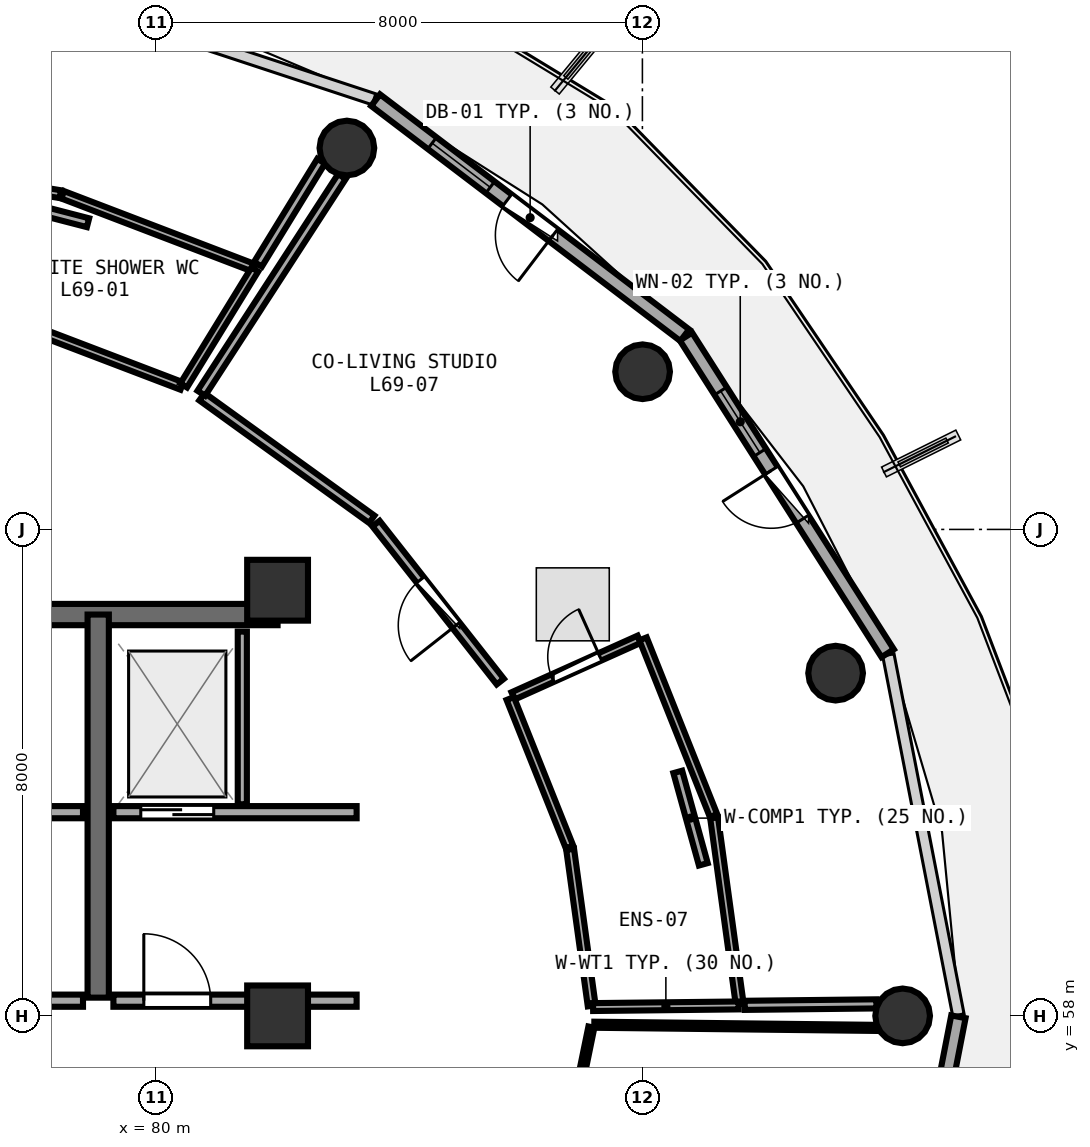
"""IFC4 building model, lengths in metres.
Left out: names, types, materials, properties, quantities, classifications, styles, units other than length and angle.
Written with IfcOpenShell. Run it as: python <this file> out.ifc"""

import sys

from ifc_helpers import new_model, si_unit, direction, frame, frame_2d, origin, origin_2d, place, context, subcontext, project, spatial, rectangle, circle, extrude, element, fill, save


model = new_model("IFC4")
c1 = context("Model", 3, precision=1e-05, world=origin(), true_north=direction((0.0, 1.0)))
c2 = subcontext(c1, "Body", "Model", "MODEL_VIEW")
j1 = project(units=[si_unit("LENGTHUNIT", "METRE"), si_unit("PLANEANGLEUNIT", "RADIAN")], contexts=[c1])
p1 = place(None, origin())
s1 = spatial("IfcSite", under=j1, at=p1, CompositionType="ELEMENT")
p2 = place(p1, origin())
s2 = spatial("IfcBuilding", under=s1, at=p2, CompositionType="ELEMENT")
p3 = place(p2, frame((0.0, 0.0, 271.2)))
s3 = spatial("IfcBuildingStorey", under=s2, at=p3, CompositionType="ELEMENT", Elevation=271.2)
for number, where, z_axis, x_axis in (
    (1, (82.0, 58.0, 0.0), (0.0, 0.0, 1.0), (1.0, 0.0, 0.0)),
    (2, (82.0, 65.0, 0.0), (0.0, 0.0, 1.0), (1.0, 0.0, 0.0)),
):
    element("IfcColumn", number, at=place(p3, frame(where, z_axis=z_axis, x_axis=x_axis)), inside=s3, PredefinedType="PILASTER", context=c2, shape_type="SweptSolid", body=[
        extrude(rectangle(XDim=1.0, YDim=1.0, at=origin_2d()), origin(), (0.0, 0.0, 1.0), 3.75),
    ])
for number, where, z_axis, x_axis in (
    (3, (92.28, 58.0, 0.0), (0.0, 0.0, 1.0), (1.0, 0.0, 0.0)),
    (4, (91.177, 63.636, 0.0), (0.0, 0.0, 1.0), (1.0, 0.0, 0.0)),
    (5, (88.003, 68.593, 0.0), (0.0, 0.0, 1.0), (1.0, 0.0, 0.0)),
    (6, (83.14, 72.272, 0.0), (0.0, 0.0, 1.0), (1.0, 0.0, 0.0)),
):
    element("IfcColumn", number, at=place(p3, frame(where, z_axis=z_axis, x_axis=x_axis)), inside=s3, PredefinedType="COLUMN", context=c2, shape_type="SweptSolid", body=[
        extrude(circle(Radius=0.45, at=origin_2d()), origin(), (0.0, 0.0, 1.0), 3.75),
    ])
p4 = place(p3, frame((92.034, 63.964, 0.0), z_axis=(0.0, 0.0, 1.0), x_axis=(-0.537271968456, 0.843409053728, 0.0)))
e7 = element("IfcWall", 7, at=p4, inside=s3, PredefinedType="SOLIDWALL", context=c2, shape_type="SweptSolid", body=[
    extrude(rectangle(XDim=6.175, YDim=0.24, at=frame_2d((3.087, 0.0))), origin(), (0.0, 0.0, 1.0), 3.475),
])
p5 = place(p4, frame((2.613, 0.0, 0.0)))
e8 = element("IfcOpeningElement", 8, at=p5, cuts=e7, PredefinedType="OPENING", context=c2, shape_type="SweptSolid", body=[
    extrude(rectangle(XDim=0.95, YDim=2.1, at=frame_2d((0.475, 1.05))), frame((0.0, 0.13, 0.0), z_axis=(0.0, -1.0, 0.0), x_axis=(1.0, 0.0, 0.0)), (0.0, 0.0, 1.0), 0.26),
])
p6 = place(p4, frame((3.913, 0.0, 0.85)))
e9 = element("IfcOpeningElement", 9, at=p6, cuts=e7, PredefinedType="OPENING", context=c2, shape_type="SweptSolid", body=[
    extrude(rectangle(XDim=1.2, YDim=1.45, at=frame_2d((0.6, 0.725))), frame((0.0, 0.13, 0.0), z_axis=(0.0, -1.0, 0.0), x_axis=(1.0, 0.0, 0.0)), (0.0, 0.0, 1.0), 0.26),
])
p7 = place(p3, frame((88.696, 69.194, 0.0), z_axis=(0.0, 0.0, 1.0), x_axis=(-0.796010444211, 0.605282886514, 0.0)))
e10 = element("IfcWall", 10, at=p7, inside=s3, PredefinedType="SOLIDWALL", context=c2, shape_type="SweptSolid", body=[
    extrude(rectangle(XDim=6.387, YDim=0.24, at=frame_2d((3.194, 0.0))), origin(), (0.0, 0.0, 1.0), 3.475),
])
p8 = place(p7, frame((2.719, 0.0, 0.0)))
e11 = element("IfcOpeningElement", 11, at=p8, cuts=e10, PredefinedType="OPENING", context=c2, shape_type="SweptSolid", body=[
    extrude(rectangle(XDim=0.95, YDim=2.1, at=frame_2d((0.475, 1.05))), frame((0.0, 0.13, 0.0), z_axis=(0.0, -1.0, 0.0), x_axis=(1.0, 0.0, 0.0)), (0.0, 0.0, 1.0), 0.26),
])
p9 = place(p7, frame((4.019, 0.0, 0.85)))
e12 = element("IfcOpeningElement", 12, at=p9, cuts=e10, PredefinedType="OPENING", context=c2, shape_type="SweptSolid", body=[
    extrude(rectangle(XDim=1.2, YDim=1.45, at=frame_2d((0.6, 0.725))), frame((0.0, 0.13, 0.0), z_axis=(0.0, -1.0, 0.0), x_axis=(1.0, 0.0, 0.0)), (0.0, 0.0, 1.0), 0.26),
])
p10 = place(p3, frame((92.045, 52.063, 0.0), z_axis=(0.0, 0.0, 1.0), x_axis=(0.190969309115, 0.981596008028, 0.0)))
e13 = element("IfcWall", 13, at=p10, inside=s3, PredefinedType="SOLIDWALL", context=c2, shape_type="SweptSolid", body=[
    extrude(rectangle(XDim=6.033, YDim=0.24, at=frame_2d((3.017, 0.0))), origin(), (0.0, 0.0, 1.0), 3.475),
])
p11 = place(p10, frame((2.216, 0.0, 0.85)))
e14 = element("IfcOpeningElement", 14, at=p11, cuts=e13, PredefinedType="OPENING", context=c2, shape_type="SweptSolid", body=[
    extrude(rectangle(XDim=1.6, YDim=1.45, at=frame_2d((0.8, 0.725))), frame((0.0, 0.13, 0.0), z_axis=(0.0, -1.0, 0.0), x_axis=(1.0, 0.0, 0.0)), (0.0, 0.0, 1.0), 0.26),
])
p12 = place(p3, frame((74.0, 64.6, 0.0), z_axis=(0.0, 0.0, 1.0), x_axis=(1.0, 0.0, 0.0)))
e15 = element("IfcWall", 15, at=p12, inside=s3, PredefinedType="SHEAR", context=c2, shape_type="SweptSolid", body=[
    extrude(rectangle(XDim=8.0, YDim=0.35, at=frame_2d((4.0, 0.0))), origin(), (0.0, 0.0, 1.0), 3.49),
])
p13 = place(p3, frame((79.05, 58.3, 0.0), z_axis=(0.0, 0.0, 1.0), x_axis=(0.0, 1.0, 0.0)))
e16 = element("IfcWall", 16, at=p13, inside=s3, PredefinedType="SHEAR", context=c2, shape_type="SweptSolid", body=[
    extrude(rectangle(XDim=6.3, YDim=0.35, at=frame_2d((3.15, 0.0))), origin(), (0.0, 0.0, 1.0), 3.49),
])
p14 = place(p3, frame((74.2, 61.35, 0.0), z_axis=(0.0, 0.0, 1.0), x_axis=(1.0, 0.0, 0.0)))
e17 = element("IfcWall", 17, at=p14, inside=s3, PredefinedType="SOLIDWALL", context=c2, shape_type="SweptSolid", body=[
    extrude(rectangle(XDim=4.6, YDim=0.2, at=frame_2d((2.3, 0.0))), origin(), (0.0, 0.0, 1.0), 3.48),
])
p15 = place(p14, frame((0.52, 0.0, 0.0)))
e18 = element("IfcOpeningElement", 18, at=p15, cuts=e17, PredefinedType="OPENING", context=c2, shape_type="SweptSolid", body=[
    extrude(rectangle(XDim=1.2, YDim=2.15, at=frame_2d((0.6, 1.075))), frame((0.0, 0.11, 0.0), z_axis=(0.0, -1.0, 0.0), x_axis=(1.0, 0.0, 0.0)), (0.0, 0.0, 1.0), 0.22),
])
p16 = place(p3, frame((79.3, 61.35, 0.0), z_axis=(0.0, 0.0, 1.0), x_axis=(1.0, 0.0, 0.0)))
e19 = element("IfcWall", 19, at=p16, inside=s3, PredefinedType="SOLIDWALL", context=c2, shape_type="SweptSolid", body=[
    extrude(rectangle(XDim=4.0, YDim=0.2, at=frame_2d((2.0, 0.0))), origin(), (0.0, 0.0, 1.0), 2.775),
])
p17 = place(p16, frame((0.45, 0.0, 0.0)))
e20 = element("IfcOpeningElement", 20, at=p17, cuts=e19, PredefinedType="OPENING", context=c2, shape_type="SweptSolid", body=[
    extrude(rectangle(XDim=1.2, YDim=2.15, at=frame_2d((0.6, 1.075))), frame((0.0, 0.11, 0.0), z_axis=(0.0, -1.0, 0.0), x_axis=(1.0, 0.0, 0.0)), (0.0, 0.0, 1.0), 0.22),
])
p18 = place(p3, frame((81.42, 61.48, 0.0), z_axis=(0.0, 0.0, 1.0), x_axis=(0.0, 1.0, 0.0)))
e21 = element("IfcWall", 21, at=p18, inside=s3, PredefinedType="PARTITIONING", context=c2, shape_type="SweptSolid", body=[
    extrude(rectangle(XDim=2.84, YDim=0.15, at=frame_2d((1.42, 0.0))), origin(), (0.0, 0.0, 1.0), 3.48),
])
p19 = place(p3, frame((74.2, 58.25, 0.0), z_axis=(0.0, 0.0, 1.0), x_axis=(1.0, 0.0, 0.0)))
e22 = element("IfcWall", 22, at=p19, inside=s3, PredefinedType="SOLIDWALL", context=c2, shape_type="SweptSolid", body=[
    extrude(rectangle(XDim=4.6, YDim=0.2, at=frame_2d((2.3, 0.0))), origin(), (0.0, 0.0, 1.0), 3.48),
])
p20 = place(p19, frame((1.8, 0.0, 0.0)))
e23 = element("IfcOpeningElement", 23, at=p20, cuts=e22, PredefinedType="OPENING", context=c2, shape_type="SweptSolid", body=[
    extrude(rectangle(XDim=1.1, YDim=2.1, at=frame_2d((0.55, 1.05))), frame((0.0, 0.11, 0.0), z_axis=(0.0, -1.0, 0.0), x_axis=(1.0, 0.0, 0.0)), (0.0, 0.0, 1.0), 0.22),
])
p21 = place(p3, frame((79.3, 58.25, 0.0), z_axis=(0.0, 0.0, 1.0), x_axis=(1.0, 0.0, 0.0)))
e24 = element("IfcWall", 24, at=p21, inside=s3, PredefinedType="SOLIDWALL", context=c2, shape_type="SweptSolid", body=[
    extrude(rectangle(XDim=4.0, YDim=0.2, at=frame_2d((2.0, 0.0))), origin(), (0.0, 0.0, 1.0), 2.775),
])
p22 = place(p21, frame((0.5, 0.0, 0.0)))
e25 = element("IfcOpeningElement", 25, at=p22, cuts=e24, PredefinedType="OPENING", context=c2, shape_type="SweptSolid", body=[
    extrude(rectangle(XDim=1.1, YDim=2.1, at=frame_2d((0.55, 1.05))), frame((0.0, 0.11, 0.0), z_axis=(0.0, -1.0, 0.0), x_axis=(1.0, 0.0, 0.0)), (0.0, 0.0, 1.0), 0.22),
])
p23 = place(p3, frame((85.874, 63.263, 0.0), z_axis=(0.0, 0.0, 1.0), x_axis=(0.912228594958, 0.409681572127, 0.0)))
e26 = element("IfcWall", 26, at=p23, inside=s3, PredefinedType="PLUMBINGWALL", context=c2, shape_type="SweptSolid", body=[
    extrude(rectangle(XDim=2.274, YDim=0.13, at=frame_2d((1.137, 0.0))), origin(), (0.0, 0.0, 1.0), 3.075),
])
p24 = place(p23, frame((0.707, 0.0, 0.0)))
e27 = element("IfcOpeningElement", 27, at=p24, cuts=e26, PredefinedType="OPENING", context=c2, shape_type="SweptSolid", body=[
    extrude(rectangle(XDim=0.86, YDim=2.05, at=frame_2d((0.43, 1.025))), frame((0.0, 0.075, 0.0), z_axis=(0.0, -1.0, 0.0), x_axis=(1.0, 0.0, 0.0)), (0.0, 0.0, 1.0), 0.15),
])
p25 = place(p3, frame((85.663, 63.497, 0.0), z_axis=(0.0, 0.0, 1.0), x_axis=(-0.618216128683, 0.786008154052, 0.0)))
e28 = element("IfcWall", 28, at=p25, inside=s3, PredefinedType="PARTITIONING", context=c2, shape_type="SweptSolid", body=[
    extrude(rectangle(XDim=3.306, YDim=0.15, at=frame_2d((1.653, 0.0))), origin(), (0.0, 0.0, 1.0), 3.075),
])
p26 = place(p25, frame((1.178, 0.0, 0.0)))
e29 = element("IfcOpeningElement", 29, at=p26, cuts=e28, PredefinedType="OPENING", context=c2, shape_type="SweptSolid", body=[
    extrude(rectangle(XDim=0.95, YDim=2.08, at=frame_2d((0.475, 1.04))), frame((0.0, 0.085, 0.0), z_axis=(0.0, -1.0, 0.0), x_axis=(1.0, 0.0, 0.0)), (0.0, 0.0, 1.0), 0.17),
])
p27 = place(p3, frame((80.426, 68.358, 0.0), z_axis=(0.0, 0.0, 1.0), x_axis=(-0.934318832382, 0.35643838101, 0.0)))
e30 = element("IfcWall", 30, at=p27, inside=s3, PredefinedType="PLUMBINGWALL", context=c2, shape_type="SweptSolid", body=[
    extrude(rectangle(XDim=2.841, YDim=0.13, at=frame_2d((1.42, 0.0))), origin(), (0.0, 0.0, 1.0), 3.48),
])
p28 = place(p3, frame((75.058, 72.06, 0.0), z_axis=(0.0, 0.0, 1.0), x_axis=(0.987096008114, -0.160129543701, 0.0)))
e31 = element("IfcWall", 31, at=p28, inside=s3, PredefinedType="PLUMBINGWALL", context=c2, shape_type="SweptSolid", body=[
    extrude(rectangle(XDim=3.414, YDim=0.13, at=frame_2d((1.707, 0.0))), origin(), (0.0, 0.0, 1.0), 3.075),
])
p29 = place(p3, frame((78.466, 71.503, 0.0), z_axis=(0.0, 0.0, 1.0), x_axis=(0.934061774164, -0.357111470057, 0.0)))
e32 = element("IfcWall", 32, at=p29, inside=s3, PredefinedType="PLUMBINGWALL", context=c2, shape_type="SweptSolid", body=[
    extrude(rectangle(XDim=3.374, YDim=0.13, at=frame_2d((1.687, 0.0))), origin(), (0.0, 0.0, 1.0), 3.48),
])
p30 = place(p3, frame((81.625, 70.274, 0.0), z_axis=(0.0, 0.0, 1.0), x_axis=(-0.523122555159, -0.852257468306, 0.0)))
e33 = element("IfcWall", 33, at=p30, inside=s3, PredefinedType="PLUMBINGWALL", context=c2, shape_type="SweptSolid", body=[
    extrude(rectangle(XDim=2.236, YDim=0.13, at=frame_2d((1.118, 0.0))), origin(), (0.0, 0.0, 1.0), 3.175),
])
p31 = place(p3, frame((82.717, 72.056, 0.0), z_axis=(0.0, 0.0, 1.0), x_axis=(-0.522809528722, -0.852449527349, 0.0)))
e34 = element("IfcWall", 34, at=p31, inside=s3, PredefinedType="PARTITIONING", context=c2, shape_type="SweptSolid", body=[
    extrude(rectangle(XDim=1.989, YDim=0.15, at=frame_2d((0.995, 0.0))), origin(), (0.0, 0.0, 1.0), 3.235),
])
p32 = place(p3, frame((78.883, 71.044, 0.0), z_axis=(0.0, 0.0, 1.0), x_axis=(-0.968105115077, 0.250544379624, 0.0)))
e35 = element("IfcWall", 35, at=p32, inside=s3, PredefinedType="PARTITIONING", context=c2, shape_type="SweptSolid", body=[
    extrude(rectangle(XDim=1.197, YDim=0.15, at=frame_2d((0.598, 0.0))), origin(), (0.0, 0.0, 1.0), 3.48),
])
p33 = place(p3, frame((86.365, 53.934, 0.0), z_axis=(0.0, 0.0, 1.0), x_axis=(0.200853183429, 0.979621354762, 0.0)))
e36 = element("IfcWall", 36, at=p33, inside=s3, PredefinedType="PARTITIONING", context=c2, shape_type="SweptSolid", body=[
    extrude(rectangle(XDim=3.963, YDim=0.1, at=frame_2d((1.981, 0.0))), origin(), (0.0, 0.0, 1.0), 3.48),
])
p34 = place(p3, frame((87.209, 57.854, 0.0), z_axis=(0.0, 0.0, 1.0), x_axis=(0.999937174585, -0.01120923205, 0.0)))
e37 = element("IfcWall", 37, at=p34, inside=s3, PredefinedType="PARTITIONING", context=c2, shape_type="SweptSolid", body=[
    extrude(rectangle(XDim=4.639, YDim=0.1, at=frame_2d((2.32, 0.0))), origin(), (0.0, 0.0, 1.0), 3.075),
])
p35 = place(p3, frame((87.166, 58.165, 0.0), z_axis=(0.0, 0.0, 1.0), x_axis=(-0.13640850471, 0.990652673667, 0.0)))
e38 = element("IfcWall", 38, at=p35, inside=s3, PredefinedType="PLUMBINGWALL", context=c2, shape_type="SweptSolid", body=[
    extrude(rectangle(XDim=2.599, YDim=0.13, at=frame_2d((1.299, 0.0))), origin(), (0.0, 0.0, 1.0), 3.075),
])
p36 = place(p3, frame((86.802, 60.778, 0.0), z_axis=(0.0, 0.0, 1.0), x_axis=(-0.370846314423, 0.92869425059, 0.0)))
e39 = element("IfcWall", 39, at=p36, inside=s3, PredefinedType="PLUMBINGWALL", context=c2, shape_type="SweptSolid", body=[
    extrude(rectangle(XDim=2.629, YDim=0.13, at=frame_2d((1.315, 0.0))), origin(), (0.0, 0.0, 1.0), 3.48),
])
p37 = place(p3, frame((88.01, 64.2, 0.0), z_axis=(0.0, 0.0, 1.0), x_axis=(0.370529396103, -0.928820739768, 0.0)))
e40 = element("IfcWall", 40, at=p37, inside=s3, PredefinedType="PLUMBINGWALL", context=c2, shape_type="SweptSolid", body=[
    extrude(rectangle(XDim=3.128, YDim=0.13, at=frame_2d((1.564, 0.0))), origin(), (0.0, 0.0, 1.0), 3.075),
])
p38 = place(p3, frame((89.18, 61.256, 0.0), z_axis=(0.0, 0.0, 1.0), x_axis=(0.13600432659, -0.990708243202, 0.0)))
e41 = element("IfcWall", 41, at=p38, inside=s3, PredefinedType="PLUMBINGWALL", context=c2, shape_type="SweptSolid", body=[
    extrude(rectangle(XDim=3.093, YDim=0.13, at=frame_2d((1.546, 0.0))), origin(), (0.0, 0.0, 1.0), 3.48),
])
p39 = place(p3, frame((89.583, 58.172, 0.0), z_axis=(0.0, 0.0, 1.0), x_axis=(-0.999938226959, -0.011114956836, 0.0)))
e42 = element("IfcWall", 42, at=p39, inside=s3, PredefinedType="PLUMBINGWALL", context=c2, shape_type="SweptSolid", body=[
    extrude(rectangle(XDim=2.394, YDim=0.13, at=frame_2d((1.197, 0.0))), origin(), (0.0, 0.0, 1.0), 3.075),
])
p40 = place(p3, frame((83.55, 66.167, 0.0), z_axis=(0.0, 0.0, 1.0), x_axis=(-0.810845521854, 0.585260232451, 0.0)))
e43 = element("IfcWall", 43, at=p40, inside=s3, PredefinedType="PARTITIONING", context=c2, shape_type="SweptSolid", body=[
    extrude(rectangle(XDim=3.445, YDim=0.15, at=frame_2d((1.722, 0.0))), origin(), (0.0, 0.0, 1.0), 3.075),
])
p41 = place(p3, frame((80.746, 68.24, 0.0), z_axis=(0.0, 0.0, 1.0), x_axis=(0.544234825024, 0.838932926539, 0.0)))
e44 = element("IfcWall", 44, at=p41, inside=s3, PredefinedType="PARTITIONING", context=c2, shape_type="SweptSolid", body=[
    extrude(rectangle(XDim=4.249, YDim=0.15, at=frame_2d((2.125, 0.0))), origin(), (0.0, 0.0, 1.0), 3.075),
])
p42 = place(p3, frame((91.848, 58.198, 0.0), z_axis=(0.0, 0.0, 1.0), x_axis=(-0.999937677283, -0.011164297964, 0.0)))
e45 = element("IfcWall", 45, at=p42, inside=s3, PredefinedType="PARTITIONING", context=c2, shape_type="SweptSolid", body=[
    extrude(rectangle(XDim=2.165, YDim=0.15, at=frame_2d((1.083, 0.0))), origin(), (0.0, 0.0, 1.0), 3.075),
])
p43 = place(p3, frame((89.002, 60.492, 0.0), z_axis=(0.0, 0.0, 1.0), x_axis=(-0.266469764124, 0.963843278136, 0.0)))
e46 = element("IfcWall", 46, at=p43, inside=s3, PredefinedType="PARTITIONING", context=c2, shape_type="SweptSolid", body=[
    extrude(rectangle(XDim=1.577, YDim=0.15, at=frame_2d((0.789, 0.0))), origin(), (0.0, 0.0, 1.0), 3.48),
])
p44 = place(p5, frame((0.95, 0.0, 0.0), z_axis=(0.0, 0.0, 1.0), x_axis=(-1.0, 0.0, 0.0)))
e47 = element("IfcDoor", 47, at=p44, inside=s3, OperationType="SINGLE_SWING_LEFT", PredefinedType="DOOR", context=c2, shape_type="SweptSolid", body=[
    extrude(rectangle(XDim=0.95, YDim=2.1, at=frame_2d((0.475, 1.05))), frame((0.0, 0.025, 0.0), z_axis=(0.0, -1.0, 0.0), x_axis=(1.0, 0.0, 0.0)), (0.0, 0.0, 1.0), 0.05),
])
fill(e8, e47)
p45 = place(p6, origin())
e48 = element("IfcWindow", 48, at=p45, inside=s3, PartitioningType="SINGLE_PANEL", PredefinedType="WINDOW", context=c2, shape_type="SweptSolid", body=[
    extrude(rectangle(XDim=1.2, YDim=1.45, at=frame_2d((0.6, 0.725))), frame((0.0, 0.03, 0.0), z_axis=(0.0, -1.0, 0.0), x_axis=(1.0, 0.0, 0.0)), (0.0, 0.0, 1.0), 0.06),
])
fill(e9, e48)
p46 = place(p8, frame((0.95, 0.0, 0.0), z_axis=(0.0, 0.0, 1.0), x_axis=(-1.0, 0.0, 0.0)))
e49 = element("IfcDoor", 49, at=p46, inside=s3, OperationType="SINGLE_SWING_RIGHT", PredefinedType="DOOR", context=c2, shape_type="SweptSolid", body=[
    extrude(rectangle(XDim=0.95, YDim=2.1, at=frame_2d((0.475, 1.05))), frame((0.0, 0.025, 0.0), z_axis=(0.0, -1.0, 0.0), x_axis=(1.0, 0.0, 0.0)), (0.0, 0.0, 1.0), 0.05),
])
fill(e11, e49)
p47 = place(p9, origin())
e50 = element("IfcWindow", 50, at=p47, inside=s3, PartitioningType="SINGLE_PANEL", PredefinedType="WINDOW", context=c2, shape_type="SweptSolid", body=[
    extrude(rectangle(XDim=1.2, YDim=1.45, at=frame_2d((0.6, 0.725))), frame((0.0, 0.03, 0.0), z_axis=(0.0, -1.0, 0.0), x_axis=(1.0, 0.0, 0.0)), (0.0, 0.0, 1.0), 0.06),
])
fill(e12, e50)
p48 = place(p17, origin())
e51 = element("IfcDoor", 51, at=p48, inside=s3, OperationType="DOUBLE_DOOR_SLIDING", PredefinedType="DOOR", context=c2, shape_type="SweptSolid", body=[
    extrude(rectangle(XDim=1.2, YDim=2.15, at=frame_2d((0.6, 1.075))), frame((0.0, 0.025, 0.0), z_axis=(0.0, -1.0, 0.0), x_axis=(1.0, 0.0, 0.0)), (0.0, 0.0, 1.0), 0.05),
])
fill(e20, e51)
p49 = place(p22, frame((1.1, 0.0, 0.0), z_axis=(0.0, 0.0, 1.0), x_axis=(-1.0, 0.0, 0.0)))
e52 = element("IfcDoor", 52, at=p49, inside=s3, OperationType="SINGLE_SWING_RIGHT", PredefinedType="DOOR", context=c2, shape_type="SweptSolid", body=[
    extrude(rectangle(XDim=1.1, YDim=2.1, at=frame_2d((0.55, 1.05))), frame((0.0, 0.025, 0.0), z_axis=(0.0, -1.0, 0.0), x_axis=(1.0, 0.0, 0.0)), (0.0, 0.0, 1.0), 0.05),
])
fill(e25, e52)
p50 = place(p24, origin())
e53 = element("IfcDoor", 53, at=p50, inside=s3, OperationType="SINGLE_SWING_RIGHT", PredefinedType="DOOR", context=c2, shape_type="SweptSolid", body=[
    extrude(rectangle(XDim=0.86, YDim=2.05, at=frame_2d((0.43, 1.025))), frame((0.0, 0.025, 0.0), z_axis=(0.0, -1.0, 0.0), x_axis=(1.0, 0.0, 0.0)), (0.0, 0.0, 1.0), 0.05),
])
fill(e27, e53)
p51 = place(p26, origin())
e54 = element("IfcDoor", 54, at=p51, inside=s3, OperationType="SINGLE_SWING_LEFT", PredefinedType="DOOR", context=c2, shape_type="SweptSolid", body=[
    extrude(rectangle(XDim=0.95, YDim=2.08, at=frame_2d((0.475, 1.04))), frame((0.0, 0.025, 0.0), z_axis=(0.0, -1.0, 0.0), x_axis=(1.0, 0.0, 0.0)), (0.0, 0.0, 1.0), 0.05),
])
fill(e29, e54)
save(model, sys.argv[1])
